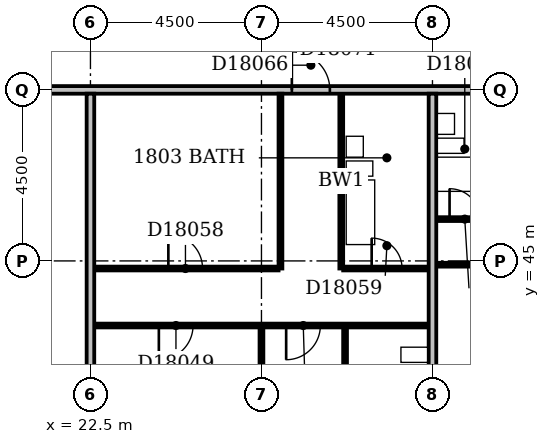
"""IFC4 building model, lengths in metres.
Left out: names, types, materials, properties, quantities, classifications, styles, units other than length and angle.
Written with IfcOpenShell. Run it as: python <this file> out.ifc"""

import sys

from ifc_helpers import new_model, si_unit, direction, frame, frame_2d, origin, place, context, subcontext, project, spatial, rectangle, extrude, element, fill, save


model = new_model("IFC4")
c1 = context("Model", 3, precision=1e-05, world=origin(), true_north=direction((0.0, 1.0)))
c2 = subcontext(c1, "Body", "Model", "MODEL_VIEW")
j1 = project(units=[si_unit("LENGTHUNIT", "METRE"), si_unit("PLANEANGLEUNIT", "RADIAN")], contexts=[c1])
p1 = place(None, origin())
s1 = spatial("IfcSite", under=j1, at=p1, CompositionType="ELEMENT")
p2 = place(p1, origin())
s2 = spatial("IfcBuilding", under=s1, at=p2, CompositionType="ELEMENT")
p3 = place(p2, frame((0.0, 0.0, 75.8)))
s3 = spatial("IfcBuildingStorey", under=s2, at=p3, CompositionType="ELEMENT", Elevation=75.8)
p4 = place(p3, frame((22.5, 36.6, 0.0), z_axis=(0.0, 0.0, 1.0), x_axis=(0.0, 1.0, 0.0)))
e1 = element("IfcWall", 1, at=p4, inside=s3, PredefinedType="PARTITIONING", context=c2, shape_type="SweptSolid", body=[
    extrude(rectangle(XDim=12.8, YDim=0.2, at=frame_2d((6.4, 0.0))), origin(), (0.0, 0.0, 1.0), 3.3),
])
p5 = place(p3, frame((27.0, 36.6, 0.0), z_axis=(0.0, 0.0, 1.0), x_axis=(0.0, 1.0, 0.0)))
e2 = element("IfcWall", 2, at=p5, inside=s3, PredefinedType="PARTITIONING", context=c2, shape_type="SweptSolid", body=[
    extrude(rectangle(XDim=6.65, YDim=0.1, at=frame_2d((3.325, 0.0))), origin(), (0.0, 0.0, 1.0), 2.6),
])
p6 = place(p3, frame((31.5, 36.6, 0.0), z_axis=(0.0, 0.0, 1.0), x_axis=(0.0, 1.0, 0.0)))
e3 = element("IfcWall", 3, at=p6, inside=s3, PredefinedType="PARTITIONING", context=c2, shape_type="SweptSolid", body=[
    extrude(rectangle(XDim=12.8, YDim=0.2, at=frame_2d((6.4, 0.0))), origin(), (0.0, 0.0, 1.0), 3.3),
])
p7 = place(p3, frame((29.2, 40.4, 0.0), z_axis=(0.0, 0.0, 1.0), x_axis=(0.0, 1.0, 0.0)))
e4 = element("IfcWall", 4, at=p7, inside=s3, PredefinedType="PLUMBINGWALL", context=c2, shape_type="SweptSolid", body=[
    extrude(rectangle(XDim=2.85, YDim=0.1, at=frame_2d((1.425, 0.0))), origin(), (0.0, 0.0, 1.0), 3.3),
])
p8 = place(p7, frame((1.05, 0.0, 0.0)))
e5 = element("IfcOpeningElement", 5, at=p8, cuts=e4, PredefinedType="OPENING", context=c2, shape_type="SweptSolid", body=[
    extrude(rectangle(XDim=0.8, YDim=2.1, at=frame_2d((0.4, 1.05))), frame((0.0, 0.062, 0.0), z_axis=(0.0, -1.0, 0.0), x_axis=(1.0, 0.0, 0.0)), (0.0, 0.0, 1.0), 0.124),
])
p9 = place(p3, frame((22.6, 43.3, 0.0), z_axis=(0.0, 0.0, 1.0), x_axis=(1.0, 0.0, 0.0)))
e6 = element("IfcWall", 6, at=p9, inside=s3, PredefinedType="PARTITIONING", context=c2, shape_type="SweptSolid", body=[
    extrude(rectangle(XDim=8.8, YDim=0.1, at=frame_2d((4.4, 0.0))), origin(), (0.0, 0.0, 1.0), 3.3),
])
p10 = place(p9, frame((1.7, 0.0, 0.0)))
e7 = element("IfcOpeningElement", 7, at=p10, cuts=e6, PredefinedType="OPENING", context=c2, shape_type="SweptSolid", body=[
    extrude(rectangle(XDim=0.9, YDim=2.1, at=frame_2d((0.45, 1.05))), frame((0.0, 0.062, 0.0), z_axis=(0.0, -1.0, 0.0), x_axis=(1.0, 0.0, 0.0)), (0.0, 0.0, 1.0), 0.124),
])
p11 = place(p9, frame((5.05, 0.0, 0.0)))
e8 = element("IfcOpeningElement", 8, at=p11, cuts=e6, PredefinedType="OPENING", context=c2, shape_type="SweptSolid", body=[
    extrude(rectangle(XDim=0.9, YDim=2.1, at=frame_2d((0.45, 1.05))), frame((0.0, 0.062, 0.0), z_axis=(0.0, -1.0, 0.0), x_axis=(1.0, 0.0, 0.0)), (0.0, 0.0, 1.0), 0.124),
])
p12 = place(p3, frame((22.6, 44.8, 0.0), z_axis=(0.0, 0.0, 1.0), x_axis=(1.0, 0.0, 0.0)))
e9 = element("IfcWall", 9, at=p12, inside=s3, PredefinedType="PARTITIONING", context=c2, shape_type="SweptSolid", body=[
    extrude(rectangle(XDim=4.85, YDim=0.1, at=frame_2d((2.425, 0.0))), origin(), (0.0, 0.0, 1.0), 3.3),
])
p13 = place(p12, frame((1.95, 0.0, 0.0)))
e10 = element("IfcOpeningElement", 10, at=p13, cuts=e9, PredefinedType="OPENING", context=c2, shape_type="SweptSolid", body=[
    extrude(rectangle(XDim=0.9, YDim=2.1, at=frame_2d((0.45, 1.05))), frame((0.0, 0.062, 0.0), z_axis=(0.0, -1.0, 0.0), x_axis=(1.0, 0.0, 0.0)), (0.0, 0.0, 1.0), 0.124),
])
p14 = place(p3, frame((27.5, 44.8, 0.0), z_axis=(0.0, 0.0, 1.0), x_axis=(0.0, 1.0, 0.0)))
e11 = element("IfcWall", 11, at=p14, inside=s3, PredefinedType="PARTITIONING", context=c2, shape_type="SweptSolid", body=[
    extrude(rectangle(XDim=4.6, YDim=0.1, at=frame_2d((2.3, 0.0))), origin(), (0.0, 0.0, 1.0), 2.6),
])
p15 = place(p3, frame((29.1, 44.8, 0.0), z_axis=(0.0, 0.0, 1.0), x_axis=(0.0, 1.0, 0.0)))
e12 = element("IfcWall", 12, at=p15, inside=s3, PredefinedType="PLUMBINGWALL", context=c2, shape_type="SweptSolid", body=[
    extrude(rectangle(XDim=4.6, YDim=0.1, at=frame_2d((2.3, 0.0))), origin(), (0.0, 0.0, 1.0), 3.3),
])
p16 = place(p3, frame((29.15, 44.8, 0.0), z_axis=(0.0, 0.0, 1.0), x_axis=(1.0, 0.0, 0.0)))
e13 = element("IfcWall", 13, at=p16, inside=s3, PredefinedType="PARTITIONING", context=c2, shape_type="SweptSolid", body=[
    extrude(rectangle(XDim=2.25, YDim=0.1, at=frame_2d((1.125, 0.0))), origin(), (0.0, 0.0, 1.0), 3.3),
])
p17 = place(p16, frame((0.75, 0.0, 0.0)))
e14 = element("IfcOpeningElement", 14, at=p17, cuts=e13, PredefinedType="OPENING", context=c2, shape_type="SweptSolid", body=[
    extrude(rectangle(XDim=0.8, YDim=2.1, at=frame_2d((0.4, 1.05))), frame((0.0, 0.062, 0.0), z_axis=(0.0, -1.0, 0.0), x_axis=(1.0, 0.0, 0.0)), (0.0, 0.0, 1.0), 0.124),
])
p18 = place(p3, frame((31.6, 44.9, 0.0), z_axis=(0.0, 0.0, 1.0), x_axis=(1.0, 0.0, 0.0)))
e15 = element("IfcWall", 15, at=p18, inside=s3, PredefinedType="PARTITIONING", context=c2, shape_type="SweptSolid", body=[
    extrude(rectangle(XDim=4.3, YDim=0.1, at=frame_2d((2.15, 0.0))), origin(), (0.0, 0.0, 1.0), 3.3),
])
p19 = place(p18, frame((1.7, 0.0, 0.0)))
e16 = element("IfcOpeningElement", 16, at=p19, cuts=e15, PredefinedType="OPENING", context=c2, shape_type="SweptSolid", body=[
    extrude(rectangle(XDim=0.9, YDim=2.1, at=frame_2d((0.45, 1.05))), frame((0.0, 0.062, 0.0), z_axis=(0.0, -1.0, 0.0), x_axis=(1.0, 0.0, 0.0)), (0.0, 0.0, 1.0), 0.124),
])
p20 = place(p3, frame((31.6, 46.1, 0.0), z_axis=(0.0, 0.0, 1.0), x_axis=(1.0, 0.0, 0.0)))
e17 = element("IfcWall", 17, at=p20, inside=s3, PredefinedType="PARTITIONING", context=c2, shape_type="SweptSolid", body=[
    extrude(rectangle(XDim=1.55, YDim=0.1, at=frame_2d((0.775, 0.0))), origin(), (0.0, 0.0, 1.0), 3.3),
])
p21 = place(p20, frame((0.35, 0.0, 0.0)))
e18 = element("IfcOpeningElement", 18, at=p21, cuts=e17, PredefinedType="OPENING", context=c2, shape_type="SweptSolid", body=[
    extrude(rectangle(XDim=0.8, YDim=2.1, at=frame_2d((0.4, 1.05))), frame((0.0, 0.062, 0.0), z_axis=(0.0, -1.0, 0.0), x_axis=(1.0, 0.0, 0.0)), (0.0, 0.0, 1.0), 0.124),
])
p22 = place(p3, frame((9.1, 49.5, 0.0), z_axis=(0.0, 0.0, 1.0), x_axis=(1.0, 0.0, 0.0)))
e19 = element("IfcWall", 19, at=p22, inside=s3, PredefinedType="PARTITIONING", context=c2, shape_type="SweptSolid", body=[
    extrude(rectangle(XDim=57.8, YDim=0.2, at=frame_2d((28.9, 0.0))), origin(), (0.0, 0.0, 1.0), 3.3),
])
p23 = place(p22, frame((18.7, 0.0, 0.0)))
e20 = element("IfcOpeningElement", 20, at=p23, cuts=e19, PredefinedType="OPENING", context=c2, shape_type="SweptSolid", body=[
    extrude(rectangle(XDim=1.0, YDim=2.1, at=frame_2d((0.5, 1.05))), frame((0.0, 0.112, 0.0), z_axis=(0.0, -1.0, 0.0), x_axis=(1.0, 0.0, 0.0)), (0.0, 0.0, 1.0), 0.224),
])
p24 = place(p22, frame((24.35, 0.0, 0.0)))
e21 = element("IfcOpeningElement", 21, at=p24, cuts=e19, PredefinedType="OPENING", context=c2, shape_type="SweptSolid", body=[
    extrude(rectangle(XDim=1.0, YDim=2.1, at=frame_2d((0.5, 1.05))), frame((0.0, 0.112, 0.0), z_axis=(0.0, -1.0, 0.0), x_axis=(1.0, 0.0, 0.0)), (0.0, 0.0, 1.0), 0.224),
])
p25 = place(p22, frame((27.2, 0.0, 0.0)))
e22 = element("IfcOpeningElement", 22, at=p25, cuts=e19, PredefinedType="OPENING", context=c2, shape_type="SweptSolid", body=[
    extrude(rectangle(XDim=1.0, YDim=2.1, at=frame_2d((0.5, 1.05))), frame((0.0, 0.112, 0.0), z_axis=(0.0, -1.0, 0.0), x_axis=(1.0, 0.0, 0.0)), (0.0, 0.0, 1.0), 0.224),
])
p26 = place(p22, frame((43.1, 0.0, 0.0)))
e23 = element("IfcOpeningElement", 23, at=p26, cuts=e19, PredefinedType="OPENING", context=c2, shape_type="SweptSolid", body=[
    extrude(rectangle(XDim=1.0, YDim=2.1, at=frame_2d((0.5, 1.05))), frame((0.0, 0.112, 0.0), z_axis=(0.0, -1.0, 0.0), x_axis=(1.0, 0.0, 0.0)), (0.0, 0.0, 1.0), 0.224),
])
p27 = place(p22, frame((3.9, 0.0, 0.0)))
e24 = element("IfcOpeningElement", 24, at=p27, cuts=e19, PredefinedType="OPENING", context=c2, shape_type="SweptSolid", body=[
    extrude(rectangle(XDim=0.9, YDim=2.1, at=frame_2d((0.45, 1.05))), frame((0.0, 0.112, 0.0), z_axis=(0.0, -1.0, 0.0), x_axis=(1.0, 0.0, 0.0)), (0.0, 0.0, 1.0), 0.224),
])
p28 = place(p10, frame((0.9, 0.0, 0.0), z_axis=(0.0, 0.0, 1.0), x_axis=(-1.0, 0.0, 0.0)))
e25 = element("IfcDoor", 25, at=p28, inside=s3, OperationType="SINGLE_SWING_RIGHT", PredefinedType="DOOR", context=c2, shape_type="SweptSolid", body=[
    extrude(rectangle(XDim=0.9, YDim=2.1, at=frame_2d((0.45, 1.05))), frame((0.0, 0.025, 0.0), z_axis=(0.0, -1.0, 0.0), x_axis=(1.0, 0.0, 0.0)), (0.0, 0.0, 1.0), 0.05),
])
fill(e7, e25)
p29 = place(p11, frame((0.9, 0.0, 0.0), z_axis=(0.0, 0.0, 1.0), x_axis=(-1.0, 0.0, 0.0)))
e26 = element("IfcDoor", 26, at=p29, inside=s3, OperationType="SINGLE_SWING_RIGHT", PredefinedType="DOOR", context=c2, shape_type="SweptSolid", body=[
    extrude(rectangle(XDim=0.9, YDim=2.1, at=frame_2d((0.45, 1.05))), frame((0.0, 0.025, 0.0), z_axis=(0.0, -1.0, 0.0), x_axis=(1.0, 0.0, 0.0)), (0.0, 0.0, 1.0), 0.05),
])
fill(e8, e26)
p30 = place(p13, origin())
e27 = element("IfcDoor", 27, at=p30, inside=s3, OperationType="SINGLE_SWING_LEFT", PredefinedType="DOOR", context=c2, shape_type="SweptSolid", body=[
    extrude(rectangle(XDim=0.9, YDim=2.1, at=frame_2d((0.45, 1.05))), frame((0.0, 0.025, 0.0), z_axis=(0.0, -1.0, 0.0), x_axis=(1.0, 0.0, 0.0)), (0.0, 0.0, 1.0), 0.05),
])
fill(e10, e27)
p31 = place(p17, origin())
e28 = element("IfcDoor", 28, at=p31, inside=s3, OperationType="SINGLE_SWING_LEFT", PredefinedType="DOOR", context=c2, shape_type="SweptSolid", body=[
    extrude(rectangle(XDim=0.8, YDim=2.1, at=frame_2d((0.4, 1.05))), frame((0.0, 0.025, 0.0), z_axis=(0.0, -1.0, 0.0), x_axis=(1.0, 0.0, 0.0)), (0.0, 0.0, 1.0), 0.05),
])
fill(e14, e28)
p32 = place(p21, origin())
e29 = element("IfcDoor", 29, at=p32, inside=s3, OperationType="SINGLE_SWING_LEFT", PredefinedType="DOOR", context=c2, shape_type="SweptSolid", body=[
    extrude(rectangle(XDim=0.8, YDim=2.1, at=frame_2d((0.4, 1.05))), frame((0.0, 0.025, 0.0), z_axis=(0.0, -1.0, 0.0), x_axis=(1.0, 0.0, 0.0)), (0.0, 0.0, 1.0), 0.05),
])
fill(e18, e29)
p33 = place(p23, origin())
e30 = element("IfcDoor", 30, at=p33, inside=s3, OperationType="SINGLE_SWING_LEFT", PredefinedType="DOOR", context=c2, shape_type="SweptSolid", body=[
    extrude(rectangle(XDim=1.0, YDim=2.1, at=frame_2d((0.5, 1.05))), frame((0.0, 0.025, 0.0), z_axis=(0.0, -1.0, 0.0), x_axis=(1.0, 0.0, 0.0)), (0.0, 0.0, 1.0), 0.05),
])
fill(e20, e30)
save(model, sys.argv[1])
